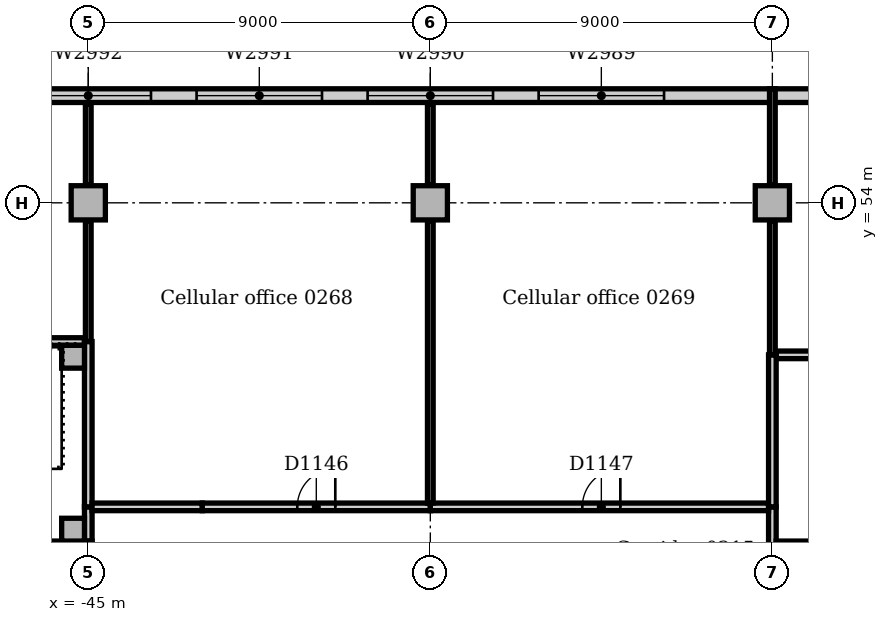
"""IFC4 building model, lengths in metres.
Left out: names, types, materials, properties, quantities, classifications, styles, units other than length and angle.
Written with IfcOpenShell. Run it as: python <this file> out.ifc"""

import sys

from ifc_helpers import new_model, si_unit, direction, frame, frame_2d, origin, origin_2d, place, context, subcontext, project, spatial, rectangle, extrude, element, fill, save


model = new_model("IFC4")
c1 = context("Model", 3, precision=1e-05, world=origin(), true_north=direction((0.0, 1.0)))
c2 = subcontext(c1, "Body", "Model", "MODEL_VIEW")
j1 = project(units=[si_unit("LENGTHUNIT", "METRE"), si_unit("PLANEANGLEUNIT", "RADIAN")], contexts=[c1])
p1 = place(None, origin())
s1 = spatial("IfcSite", under=j1, at=p1, CompositionType="ELEMENT")
p2 = place(p1, origin())
s2 = spatial("IfcBuilding", under=s1, at=p2, CompositionType="ELEMENT")
p3 = place(p2, frame((0.0, 0.0, 11.0)))
s3 = spatial("IfcBuildingStorey", under=s2, at=p3, CompositionType="ELEMENT", Elevation=11.0)
for number, where, z_axis, x_axis in (
    (1, (-45.0, 54.0, 0.0), (0.0, 0.0, 1.0), (1.0, 0.0, 0.0)),
    (2, (-36.0, 54.0, 0.0), (0.0, 0.0, 1.0), (1.0, 0.0, 0.0)),
    (3, (-27.0, 54.0, 0.0), (0.0, 0.0, 1.0), (1.0, 0.0, 0.0)),
):
    element("IfcColumn", number, at=place(p3, frame(where, z_axis=z_axis, x_axis=x_axis)), inside=s3, PredefinedType="COLUMN", context=c2, shape_type="SweptSolid", body=[
        extrude(rectangle(XDim=0.9, YDim=0.9, at=origin_2d()), origin(), (0.0, 0.0, 1.0), 4.7),
    ])
p4 = place(p3, frame((63.0, 56.82, 0.0), z_axis=(0.0, 0.0, 1.0), x_axis=(-1.0, 0.0, 0.0)))
e4 = element("IfcWall", 4, at=p4, inside=s3, PredefinedType="STANDARD", context=c2, shape_type="SweptSolid", body=[
    extrude(rectangle(XDim=144.0, YDim=0.36, at=frame_2d((72.0, 0.0))), origin(), (0.0, 0.0, 1.0), 4.7),
])
p5 = place(p4, frame((2.85, 0.0, 0.9)))
e5 = element("IfcOpeningElement", 5, at=p5, cuts=e4, PredefinedType="OPENING", context=c2, shape_type="SweptSolid", body=[
    extrude(rectangle(XDim=3.3, YDim=2.4, at=frame_2d((1.65, 1.2))), frame((0.0, 0.19, 0.0), z_axis=(0.0, -1.0, 0.0), x_axis=(1.0, 0.0, 0.0)), (0.0, 0.0, 1.0), 0.38),
])
p6 = place(p4, frame((7.35, 0.0, 0.9)))
e6 = element("IfcOpeningElement", 6, at=p6, cuts=e4, PredefinedType="OPENING", context=c2, shape_type="SweptSolid", body=[
    extrude(rectangle(XDim=3.3, YDim=2.4, at=frame_2d((1.65, 1.2))), frame((0.0, 0.19, 0.0), z_axis=(0.0, -1.0, 0.0), x_axis=(1.0, 0.0, 0.0)), (0.0, 0.0, 1.0), 0.38),
])
p7 = place(p4, frame((11.85, 0.0, 0.9)))
e7 = element("IfcOpeningElement", 7, at=p7, cuts=e4, PredefinedType="OPENING", context=c2, shape_type="SweptSolid", body=[
    extrude(rectangle(XDim=3.3, YDim=2.4, at=frame_2d((1.65, 1.2))), frame((0.0, 0.19, 0.0), z_axis=(0.0, -1.0, 0.0), x_axis=(1.0, 0.0, 0.0)), (0.0, 0.0, 1.0), 0.38),
])
p8 = place(p4, frame((16.35, 0.0, 0.9)))
e8 = element("IfcOpeningElement", 8, at=p8, cuts=e4, PredefinedType="OPENING", context=c2, shape_type="SweptSolid", body=[
    extrude(rectangle(XDim=3.3, YDim=2.4, at=frame_2d((1.65, 1.2))), frame((0.0, 0.19, 0.0), z_axis=(0.0, -1.0, 0.0), x_axis=(1.0, 0.0, 0.0)), (0.0, 0.0, 1.0), 0.38),
])
p9 = place(p4, frame((20.85, 0.0, 0.9)))
e9 = element("IfcOpeningElement", 9, at=p9, cuts=e4, PredefinedType="OPENING", context=c2, shape_type="SweptSolid", body=[
    extrude(rectangle(XDim=3.3, YDim=2.4, at=frame_2d((1.65, 1.2))), frame((0.0, 0.19, 0.0), z_axis=(0.0, -1.0, 0.0), x_axis=(1.0, 0.0, 0.0)), (0.0, 0.0, 1.0), 0.38),
])
p10 = place(p4, frame((25.35, 0.0, 0.9)))
e10 = element("IfcOpeningElement", 10, at=p10, cuts=e4, PredefinedType="OPENING", context=c2, shape_type="SweptSolid", body=[
    extrude(rectangle(XDim=3.3, YDim=2.4, at=frame_2d((1.65, 1.2))), frame((0.0, 0.19, 0.0), z_axis=(0.0, -1.0, 0.0), x_axis=(1.0, 0.0, 0.0)), (0.0, 0.0, 1.0), 0.38),
])
p11 = place(p4, frame((29.85, 0.0, 0.9)))
e11 = element("IfcOpeningElement", 11, at=p11, cuts=e4, PredefinedType="OPENING", context=c2, shape_type="SweptSolid", body=[
    extrude(rectangle(XDim=3.3, YDim=2.4, at=frame_2d((1.65, 1.2))), frame((0.0, 0.19, 0.0), z_axis=(0.0, -1.0, 0.0), x_axis=(1.0, 0.0, 0.0)), (0.0, 0.0, 1.0), 0.38),
])
p12 = place(p4, frame((34.35, 0.0, 0.9)))
e12 = element("IfcOpeningElement", 12, at=p12, cuts=e4, PredefinedType="OPENING", context=c2, shape_type="SweptSolid", body=[
    extrude(rectangle(XDim=3.3, YDim=2.4, at=frame_2d((1.65, 1.2))), frame((0.0, 0.19, 0.0), z_axis=(0.0, -1.0, 0.0), x_axis=(1.0, 0.0, 0.0)), (0.0, 0.0, 1.0), 0.38),
])
p13 = place(p4, frame((38.85, 0.0, 0.9)))
e13 = element("IfcOpeningElement", 13, at=p13, cuts=e4, PredefinedType="OPENING", context=c2, shape_type="SweptSolid", body=[
    extrude(rectangle(XDim=3.3, YDim=2.4, at=frame_2d((1.65, 1.2))), frame((0.0, 0.19, 0.0), z_axis=(0.0, -1.0, 0.0), x_axis=(1.0, 0.0, 0.0)), (0.0, 0.0, 1.0), 0.38),
])
p14 = place(p4, frame((43.35, 0.0, 0.9)))
e14 = element("IfcOpeningElement", 14, at=p14, cuts=e4, PredefinedType="OPENING", context=c2, shape_type="SweptSolid", body=[
    extrude(rectangle(XDim=3.3, YDim=2.4, at=frame_2d((1.65, 1.2))), frame((0.0, 0.19, 0.0), z_axis=(0.0, -1.0, 0.0), x_axis=(1.0, 0.0, 0.0)), (0.0, 0.0, 1.0), 0.38),
])
p15 = place(p4, frame((47.85, 0.0, 0.9)))
e15 = element("IfcOpeningElement", 15, at=p15, cuts=e4, PredefinedType="OPENING", context=c2, shape_type="SweptSolid", body=[
    extrude(rectangle(XDim=3.3, YDim=2.4, at=frame_2d((1.65, 1.2))), frame((0.0, 0.19, 0.0), z_axis=(0.0, -1.0, 0.0), x_axis=(1.0, 0.0, 0.0)), (0.0, 0.0, 1.0), 0.38),
])
p16 = place(p4, frame((52.35, 0.0, 0.9)))
e16 = element("IfcOpeningElement", 16, at=p16, cuts=e4, PredefinedType="OPENING", context=c2, shape_type="SweptSolid", body=[
    extrude(rectangle(XDim=3.3, YDim=2.4, at=frame_2d((1.65, 1.2))), frame((0.0, 0.19, 0.0), z_axis=(0.0, -1.0, 0.0), x_axis=(1.0, 0.0, 0.0)), (0.0, 0.0, 1.0), 0.38),
])
p17 = place(p4, frame((56.85, 0.0, 0.9)))
e17 = element("IfcOpeningElement", 17, at=p17, cuts=e4, PredefinedType="OPENING", context=c2, shape_type="SweptSolid", body=[
    extrude(rectangle(XDim=3.3, YDim=2.4, at=frame_2d((1.65, 1.2))), frame((0.0, 0.19, 0.0), z_axis=(0.0, -1.0, 0.0), x_axis=(1.0, 0.0, 0.0)), (0.0, 0.0, 1.0), 0.38),
])
p18 = place(p4, frame((92.85, 0.0, 0.9)))
e18 = element("IfcOpeningElement", 18, at=p18, cuts=e4, PredefinedType="OPENING", context=c2, shape_type="SweptSolid", body=[
    extrude(rectangle(XDim=3.3, YDim=2.4, at=frame_2d((1.65, 1.2))), frame((0.0, 0.19, 0.0), z_axis=(0.0, -1.0, 0.0), x_axis=(1.0, 0.0, 0.0)), (0.0, 0.0, 1.0), 0.38),
])
p19 = place(p4, frame((97.35, 0.0, 0.9)))
e19 = element("IfcOpeningElement", 19, at=p19, cuts=e4, PredefinedType="OPENING", context=c2, shape_type="SweptSolid", body=[
    extrude(rectangle(XDim=3.3, YDim=2.4, at=frame_2d((1.65, 1.2))), frame((0.0, 0.19, 0.0), z_axis=(0.0, -1.0, 0.0), x_axis=(1.0, 0.0, 0.0)), (0.0, 0.0, 1.0), 0.38),
])
p20 = place(p4, frame((101.85, 0.0, 0.9)))
e20 = element("IfcOpeningElement", 20, at=p20, cuts=e4, PredefinedType="OPENING", context=c2, shape_type="SweptSolid", body=[
    extrude(rectangle(XDim=3.3, YDim=2.4, at=frame_2d((1.65, 1.2))), frame((0.0, 0.19, 0.0), z_axis=(0.0, -1.0, 0.0), x_axis=(1.0, 0.0, 0.0)), (0.0, 0.0, 1.0), 0.38),
])
p21 = place(p4, frame((106.35, 0.0, 0.9)))
e21 = element("IfcOpeningElement", 21, at=p21, cuts=e4, PredefinedType="OPENING", context=c2, shape_type="SweptSolid", body=[
    extrude(rectangle(XDim=3.3, YDim=2.4, at=frame_2d((1.65, 1.2))), frame((0.0, 0.19, 0.0), z_axis=(0.0, -1.0, 0.0), x_axis=(1.0, 0.0, 0.0)), (0.0, 0.0, 1.0), 0.38),
])
p22 = place(p4, frame((110.85, 0.0, 0.9)))
e22 = element("IfcOpeningElement", 22, at=p22, cuts=e4, PredefinedType="OPENING", context=c2, shape_type="SweptSolid", body=[
    extrude(rectangle(XDim=3.3, YDim=2.4, at=frame_2d((1.65, 1.2))), frame((0.0, 0.19, 0.0), z_axis=(0.0, -1.0, 0.0), x_axis=(1.0, 0.0, 0.0)), (0.0, 0.0, 1.0), 0.38),
])
p23 = place(p4, frame((115.35, 0.0, 0.9)))
e23 = element("IfcOpeningElement", 23, at=p23, cuts=e4, PredefinedType="OPENING", context=c2, shape_type="SweptSolid", body=[
    extrude(rectangle(XDim=3.3, YDim=2.4, at=frame_2d((1.65, 1.2))), frame((0.0, 0.19, 0.0), z_axis=(0.0, -1.0, 0.0), x_axis=(1.0, 0.0, 0.0)), (0.0, 0.0, 1.0), 0.38),
])
p24 = place(p4, frame((119.85, 0.0, 0.9)))
e24 = element("IfcOpeningElement", 24, at=p24, cuts=e4, PredefinedType="OPENING", context=c2, shape_type="SweptSolid", body=[
    extrude(rectangle(XDim=3.3, YDim=2.4, at=frame_2d((1.65, 1.2))), frame((0.0, 0.19, 0.0), z_axis=(0.0, -1.0, 0.0), x_axis=(1.0, 0.0, 0.0)), (0.0, 0.0, 1.0), 0.38),
])
p25 = place(p4, frame((124.35, 0.0, 0.9)))
e25 = element("IfcOpeningElement", 25, at=p25, cuts=e4, PredefinedType="OPENING", context=c2, shape_type="SweptSolid", body=[
    extrude(rectangle(XDim=3.3, YDim=2.4, at=frame_2d((1.65, 1.2))), frame((0.0, 0.19, 0.0), z_axis=(0.0, -1.0, 0.0), x_axis=(1.0, 0.0, 0.0)), (0.0, 0.0, 1.0), 0.38),
])
p26 = place(p4, frame((128.85, 0.0, 0.9)))
e26 = element("IfcOpeningElement", 26, at=p26, cuts=e4, PredefinedType="OPENING", context=c2, shape_type="SweptSolid", body=[
    extrude(rectangle(XDim=3.3, YDim=2.4, at=frame_2d((1.65, 1.2))), frame((0.0, 0.19, 0.0), z_axis=(0.0, -1.0, 0.0), x_axis=(1.0, 0.0, 0.0)), (0.0, 0.0, 1.0), 0.38),
])
p27 = place(p4, frame((133.35, 0.0, 0.9)))
e27 = element("IfcOpeningElement", 27, at=p27, cuts=e4, PredefinedType="OPENING", context=c2, shape_type="SweptSolid", body=[
    extrude(rectangle(XDim=3.3, YDim=2.4, at=frame_2d((1.65, 1.2))), frame((0.0, 0.19, 0.0), z_axis=(0.0, -1.0, 0.0), x_axis=(1.0, 0.0, 0.0)), (0.0, 0.0, 1.0), 0.38),
])
p28 = place(p4, frame((137.85, 0.0, 0.9)))
e28 = element("IfcOpeningElement", 28, at=p28, cuts=e4, PredefinedType="OPENING", context=c2, shape_type="SweptSolid", body=[
    extrude(rectangle(XDim=3.3, YDim=2.4, at=frame_2d((1.65, 1.2))), frame((0.0, 0.19, 0.0), z_axis=(0.0, -1.0, 0.0), x_axis=(1.0, 0.0, 0.0)), (0.0, 0.0, 1.0), 0.38),
])
for number, where, z_axis, x_axis in (
    (29, (-45.4, 49.95, 0.0), (0.0, 0.0, 1.0), (1.0, 0.0, 0.0)),
    (30, (-45.4, 45.4, 0.0), (0.0, 0.0, 1.0), (1.0, 0.0, 0.0)),
):
    element("IfcColumn", number, at=place(p3, frame(where, z_axis=z_axis, x_axis=x_axis)), inside=s3, PredefinedType="COLUMN", context=c2, shape_type="SweptSolid", body=[
        extrude(rectangle(XDim=0.6, YDim=0.6, at=origin_2d()), origin(), (0.0, 0.0, 1.0), 5.0),
    ])
p29 = place(p3, frame((-45.0, 45.1, 0.0), z_axis=(0.0, 0.0, 1.0), x_axis=(0.0, 1.0, 0.0)))
e31 = element("IfcWall", 31, at=p29, inside=s3, PredefinedType="SOLIDWALL", context=c2, shape_type="SweptSolid", body=[
    extrude(rectangle(XDim=0.9, YDim=0.2, at=frame_2d((0.45, 0.0))), origin(), (0.0, 0.0, 1.0), 4.7),
])
p30 = place(p3, frame((-54.0, 45.0, 0.0), z_axis=(0.0, 0.0, 1.0), x_axis=(1.0, 0.0, 0.0)))
e32 = element("IfcWall", 32, at=p30, inside=s3, PredefinedType="SOLIDWALL", context=c2, shape_type="SweptSolid", body=[
    extrude(rectangle(XDim=9.1, YDim=0.2, at=frame_2d((4.55, 0.0))), origin(), (0.0, 0.0, 1.0), 4.7),
])
p31 = place(p30, frame((0.8, 0.0, 0.0)))
e33 = element("IfcOpeningElement", 33, at=p31, cuts=e32, PredefinedType="OPENING", context=c2, shape_type="SweptSolid", body=[
    extrude(rectangle(XDim=1.2, YDim=2.1, at=frame_2d((0.6, 1.05))), frame((0.0, 0.11, 0.0), z_axis=(0.0, -1.0, 0.0), x_axis=(1.0, 0.0, 0.0)), (0.0, 0.0, 1.0), 0.22),
])
p32 = place(p3, frame((-54.1, 50.35, 0.0), z_axis=(0.0, 0.0, 1.0), x_axis=(1.0, 0.0, 0.0)))
e34 = element("IfcWall", 34, at=p32, inside=s3, PredefinedType="SOLIDWALL", context=c2, shape_type="SweptSolid", body=[
    extrude(rectangle(XDim=9.0, YDim=0.2, at=frame_2d((4.5, 0.0))), origin(), (0.0, 0.0, 1.0), 4.7),
])
p33 = place(p3, frame((-45.0, 46.0, 0.0), z_axis=(0.0, 0.0, 1.0), x_axis=(0.0, 1.0, 0.0)))
e35 = element("IfcWall", 35, at=p33, inside=s3, PredefinedType="SOLIDWALL", context=c2, shape_type="SweptSolid", body=[
    extrude(rectangle(XDim=4.35, YDim=0.2, at=frame_2d((2.175, 0.0))), origin(), (0.0, 0.0, 1.0), 4.7),
])
p34 = place(p3, frame((-44.9, 46.0, 0.0), z_axis=(0.0, 0.0, 1.0), x_axis=(1.0, 0.0, 0.0)))
e36 = element("IfcWall", 36, at=p34, inside=s3, PredefinedType="PARTITIONING", context=c2, shape_type="SweptSolid", body=[
    extrude(rectangle(XDim=2.9, YDim=0.2, at=frame_2d((1.45, 0.0))), origin(), (0.0, 0.0, 1.0), 4.7),
])
p35 = place(p3, frame((-27.0, 45.0, 0.0), z_axis=(0.0, 0.0, 1.0), x_axis=(0.0, 1.0, 0.0)))
e37 = element("IfcWall", 37, at=p35, inside=s3, PredefinedType="PARTITIONING", context=c2, shape_type="SweptSolid", body=[
    extrude(rectangle(XDim=1.0, YDim=0.2, at=frame_2d((0.5, 0.0))), origin(), (0.0, 0.0, 1.0), 4.7),
])
p36 = place(p3, frame((-42.0, 46.0, 0.0), z_axis=(0.0, 0.0, 1.0), x_axis=(1.0, 0.0, 0.0)))
e38 = element("IfcWall", 38, at=p36, inside=s3, PredefinedType="PARTITIONING", context=c2, shape_type="SweptSolid", body=[
    extrude(rectangle(XDim=6.0, YDim=0.2, at=frame_2d((3.0, 0.0))), origin(), (0.0, 0.0, 1.0), 4.7),
])
p37 = place(p36, frame((2.5, 0.0, 0.0)))
e39 = element("IfcOpeningElement", 39, at=p37, cuts=e38, PredefinedType="OPENING", context=c2, shape_type="SweptSolid", body=[
    extrude(rectangle(XDim=1.0, YDim=2.1, at=frame_2d((0.5, 1.05))), frame((0.0, 0.11, 0.0), z_axis=(0.0, -1.0, 0.0), x_axis=(1.0, 0.0, 0.0)), (0.0, 0.0, 1.0), 0.22),
])
p38 = place(p3, frame((-36.0, 46.0, 0.0), z_axis=(0.0, 0.0, 1.0), x_axis=(1.0, 0.0, 0.0)))
e40 = element("IfcWall", 40, at=p38, inside=s3, PredefinedType="PARTITIONING", context=c2, shape_type="SweptSolid", body=[
    extrude(rectangle(XDim=8.9, YDim=0.2, at=frame_2d((4.45, 0.0))), origin(), (0.0, 0.0, 1.0), 4.7),
])
p39 = place(p38, frame((4.0, 0.0, 0.0)))
e41 = element("IfcOpeningElement", 41, at=p39, cuts=e40, PredefinedType="OPENING", context=c2, shape_type="SweptSolid", body=[
    extrude(rectangle(XDim=1.0, YDim=2.1, at=frame_2d((0.5, 1.05))), frame((0.0, 0.11, 0.0), z_axis=(0.0, -1.0, 0.0), x_axis=(1.0, 0.0, 0.0)), (0.0, 0.0, 1.0), 0.22),
])
p40 = place(p3, frame((-26.9, 45.0, 0.0), z_axis=(0.0, 0.0, 1.0), x_axis=(1.0, 0.0, 0.0)))
e42 = element("IfcWall", 42, at=p40, inside=s3, PredefinedType="PARTITIONING", context=c2, shape_type="SweptSolid", body=[
    extrude(rectangle(XDim=8.43, YDim=0.2, at=frame_2d((4.215, 0.0))), origin(), (0.0, 0.0, 1.0), 4.7),
])
p41 = place(p3, frame((-26.9, 50.0, 0.0), z_axis=(0.0, 0.0, 1.0), x_axis=(1.0, 0.0, 0.0)))
e43 = element("IfcWall", 43, at=p41, inside=s3, PredefinedType="PARTITIONING", context=c2, shape_type="SweptSolid", body=[
    extrude(rectangle(XDim=8.9, YDim=0.2, at=frame_2d((4.45, 0.0))), origin(), (0.0, 0.0, 1.0), 4.7),
])
p42 = place(p41, frame((3.9, 0.0, 0.0)))
e44 = element("IfcOpeningElement", 44, at=p42, cuts=e43, PredefinedType="OPENING", context=c2, shape_type="SweptSolid", body=[
    extrude(rectangle(XDim=1.0, YDim=2.1, at=frame_2d((0.5, 1.05))), frame((0.0, 0.11, 0.0), z_axis=(0.0, -1.0, 0.0), x_axis=(1.0, 0.0, 0.0)), (0.0, 0.0, 1.0), 0.22),
])
p43 = place(p3, frame((-27.0, 46.0, 0.0), z_axis=(0.0, 0.0, 1.0), x_axis=(0.0, 1.0, 0.0)))
e45 = element("IfcWall", 45, at=p43, inside=s3, PredefinedType="PARTITIONING", context=c2, shape_type="SweptSolid", body=[
    extrude(rectangle(XDim=4.0, YDim=0.2, at=frame_2d((2.0, 0.0))), origin(), (0.0, 0.0, 1.0), 4.7),
])
p44 = place(p3, frame((-27.0, 50.0, 0.0), z_axis=(0.0, 0.0, 1.0), x_axis=(0.0, 1.0, 0.0)))
e46 = element("IfcWall", 46, at=p44, inside=s3, PredefinedType="PARTITIONING", context=c2, shape_type="SweptSolid", body=[
    extrude(rectangle(XDim=3.53, YDim=0.15, at=frame_2d((1.765, 0.0))), origin(), (0.0, 0.0, 1.0), 4.7),
])
p45 = place(p3, frame((-27.0, 54.47, 0.0), z_axis=(0.0, 0.0, 1.0), x_axis=(0.0, 1.0, 0.0)))
e47 = element("IfcWall", 47, at=p45, inside=s3, PredefinedType="PARTITIONING", context=c2, shape_type="SweptSolid", body=[
    extrude(rectangle(XDim=2.53, YDim=0.15, at=frame_2d((1.265, 0.0))), origin(), (0.0, 0.0, 1.0), 4.7),
])
p46 = place(p3, frame((-45.0, 50.35, 0.0), z_axis=(0.0, 0.0, 1.0), x_axis=(0.0, 1.0, 0.0)))
e48 = element("IfcWall", 48, at=p46, inside=s3, PredefinedType="PARTITIONING", context=c2, shape_type="SweptSolid", body=[
    extrude(rectangle(XDim=3.18, YDim=0.15, at=frame_2d((1.59, 0.0))), origin(), (0.0, 0.0, 1.0), 4.7),
])
p47 = place(p3, frame((-45.0, 54.47, 0.0), z_axis=(0.0, 0.0, 1.0), x_axis=(0.0, 1.0, 0.0)))
e49 = element("IfcWall", 49, at=p47, inside=s3, PredefinedType="PARTITIONING", context=c2, shape_type="SweptSolid", body=[
    extrude(rectangle(XDim=2.13, YDim=0.15, at=frame_2d((1.065, 0.0))), origin(), (0.0, 0.0, 1.0), 4.7),
])
p48 = place(p3, frame((-36.0, 46.1, 0.0), z_axis=(0.0, 0.0, 1.0), x_axis=(0.0, 1.0, 0.0)))
e50 = element("IfcWall", 50, at=p48, inside=s3, PredefinedType="PARTITIONING", context=c2, shape_type="SweptSolid", body=[
    extrude(rectangle(XDim=7.43, YDim=0.15, at=frame_2d((3.715, 0.0))), origin(), (0.0, 0.0, 1.0), 4.7),
])
p49 = place(p3, frame((-36.0, 54.47, 0.0), z_axis=(0.0, 0.0, 1.0), x_axis=(0.0, 1.0, 0.0)))
e51 = element("IfcWall", 51, at=p49, inside=s3, PredefinedType="PARTITIONING", context=c2, shape_type="SweptSolid", body=[
    extrude(rectangle(XDim=2.13, YDim=0.15, at=frame_2d((1.065, 0.0))), origin(), (0.0, 0.0, 1.0), 4.7),
])
p50 = place(p18, origin())
e52 = element("IfcWindow", 52, at=p50, inside=s3, PartitioningType="SINGLE_PANEL", PredefinedType="WINDOW", context=c2, shape_type="SweptSolid", body=[
    extrude(rectangle(XDim=3.3, YDim=2.4, at=frame_2d((1.65, 1.2))), frame((0.0, 0.13, 0.0), z_axis=(0.0, -1.0, 0.0), x_axis=(1.0, 0.0, 0.0)), (0.0, 0.0, 1.0), 0.06),
])
fill(e18, e52)
p51 = place(p19, origin())
e53 = element("IfcWindow", 53, at=p51, inside=s3, PartitioningType="SINGLE_PANEL", PredefinedType="WINDOW", context=c2, shape_type="SweptSolid", body=[
    extrude(rectangle(XDim=3.3, YDim=2.4, at=frame_2d((1.65, 1.2))), frame((0.0, 0.13, 0.0), z_axis=(0.0, -1.0, 0.0), x_axis=(1.0, 0.0, 0.0)), (0.0, 0.0, 1.0), 0.06),
])
fill(e19, e53)
p52 = place(p20, origin())
e54 = element("IfcWindow", 54, at=p52, inside=s3, PartitioningType="SINGLE_PANEL", PredefinedType="WINDOW", context=c2, shape_type="SweptSolid", body=[
    extrude(rectangle(XDim=3.3, YDim=2.4, at=frame_2d((1.65, 1.2))), frame((0.0, 0.13, 0.0), z_axis=(0.0, -1.0, 0.0), x_axis=(1.0, 0.0, 0.0)), (0.0, 0.0, 1.0), 0.06),
])
fill(e20, e54)
p53 = place(p21, origin())
e55 = element("IfcWindow", 55, at=p53, inside=s3, PartitioningType="SINGLE_PANEL", PredefinedType="WINDOW", context=c2, shape_type="SweptSolid", body=[
    extrude(rectangle(XDim=3.3, YDim=2.4, at=frame_2d((1.65, 1.2))), frame((0.0, 0.13, 0.0), z_axis=(0.0, -1.0, 0.0), x_axis=(1.0, 0.0, 0.0)), (0.0, 0.0, 1.0), 0.06),
])
fill(e21, e55)
p54 = place(p37, origin())
e56 = element("IfcDoor", 56, at=p54, inside=s3, OperationType="SINGLE_SWING_RIGHT", PredefinedType="DOOR", context=c2, shape_type="SweptSolid", body=[
    extrude(rectangle(XDim=1.0, YDim=2.1, at=frame_2d((0.5, 1.05))), frame((0.0, 0.025, 0.0), z_axis=(0.0, -1.0, 0.0), x_axis=(1.0, 0.0, 0.0)), (0.0, 0.0, 1.0), 0.05),
])
fill(e39, e56)
p55 = place(p39, origin())
e57 = element("IfcDoor", 57, at=p55, inside=s3, OperationType="SINGLE_SWING_RIGHT", PredefinedType="DOOR", context=c2, shape_type="SweptSolid", body=[
    extrude(rectangle(XDim=1.0, YDim=2.1, at=frame_2d((0.5, 1.05))), frame((0.0, 0.025, 0.0), z_axis=(0.0, -1.0, 0.0), x_axis=(1.0, 0.0, 0.0)), (0.0, 0.0, 1.0), 0.05),
])
fill(e41, e57)
save(model, sys.argv[1])
